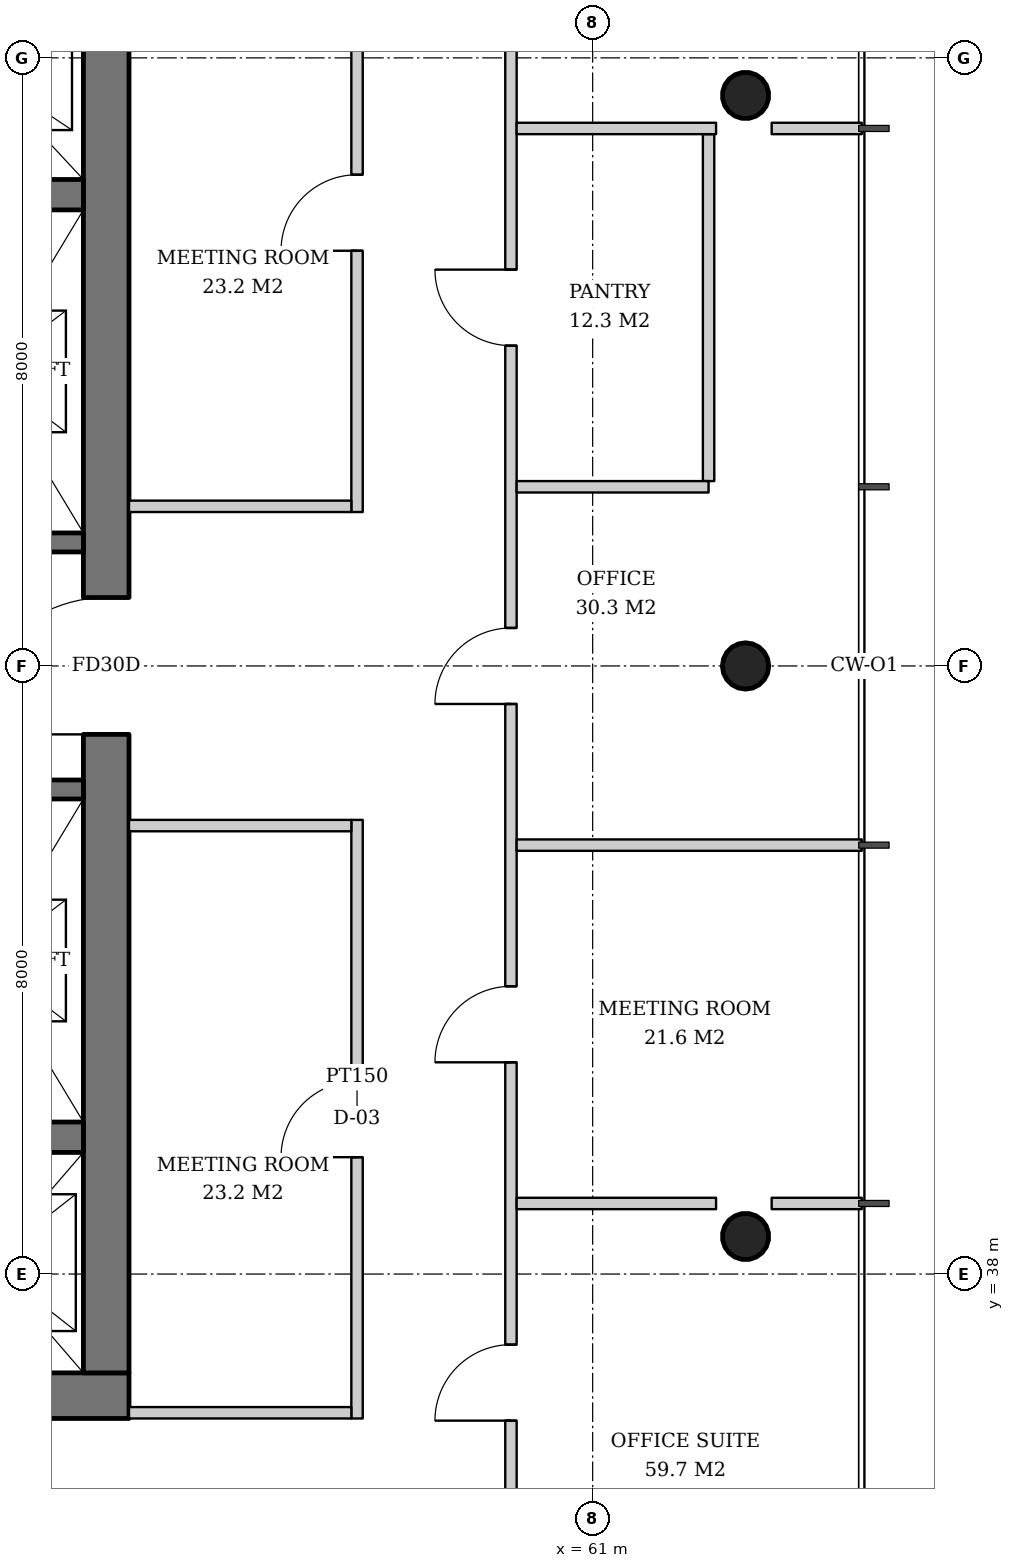
"""IFC4 building model, lengths in metres.
Left out: names, types, materials, properties, quantities, classifications, styles, units other than length and angle.
Written with IfcOpenShell. Run it as: python <this file> out.ifc"""

import sys

from ifc_helpers import new_model, si_unit, direction, frame, frame_2d, origin, origin_2d, place, context, subcontext, project, spatial, rectangle, hollow_circle, extrude, element, fill, save


model = new_model("IFC4")
c1 = context("Model", 3, precision=1e-05, world=origin(), true_north=direction((0.0, 1.0)))
c2 = subcontext(c1, "Body", "Model", "MODEL_VIEW")
j1 = project(units=[si_unit("LENGTHUNIT", "METRE"), si_unit("PLANEANGLEUNIT", "RADIAN")], contexts=[c1])
p1 = place(None, origin())
s1 = spatial("IfcSite", under=j1, at=p1, CompositionType="ELEMENT")
p2 = place(p1, origin())
s2 = spatial("IfcBuilding", under=s1, at=p2, CompositionType="ELEMENT")
p3 = place(p2, frame((0.0, 0.0, 207.2)))
s3 = spatial("IfcBuildingStorey", under=s2, at=p3, CompositionType="ELEMENT", Elevation=207.2)
p4 = place(p3, frame((63.05, 38.475, 0.0), z_axis=(-0.031974442509, 0.015923015547, 0.999361842679), x_axis=(-0.445775033553, -0.895145027055, 0.0)))
e1 = element("IfcColumn", 1, at=p4, inside=s3, PredefinedType="COLUMN", context=c2, shape_type="SweptSolid", body=[
    extrude(hollow_circle(Radius=0.305, WallThickness=0.025, at=origin_2d()), origin(), (0.0, 0.0, 1.0), 3.802),
])
p5 = place(p3, frame((63.05, 46.0, 0.0), z_axis=(-0.031978496719, 0.0, 0.999488557087), x_axis=(0.0, -1.0, 0.0)))
e2 = element("IfcColumn", 2, at=p5, inside=s3, PredefinedType="COLUMN", context=c2, shape_type="SweptSolid", body=[
    extrude(hollow_circle(Radius=0.305, WallThickness=0.025, at=origin_2d()), origin(), (0.0, 0.0, 1.0), 3.802),
])
p6 = place(p3, frame((63.05, 53.525, 0.0), z_axis=(-0.031974442509, -0.015923015547, 0.999361842679), x_axis=(0.445775033553, -0.895145027055, 0.0)))
e3 = element("IfcColumn", 3, at=p6, inside=s3, PredefinedType="COLUMN", context=c2, shape_type="SweptSolid", body=[
    extrude(hollow_circle(Radius=0.305, WallThickness=0.025, at=origin_2d()), origin(), (0.0, 0.0, 1.0), 3.802),
])
p7 = place(p3, frame((35.1, 36.4, 0.0), z_axis=(0.0, 0.0, 1.0), x_axis=(1.0, 0.0, 0.0)))
e4 = element("IfcWall", 4, at=p7, inside=s3, PredefinedType="SHEAR", context=c2, shape_type="SweptSolid", body=[
    extrude(rectangle(XDim=19.8, YDim=0.6, at=frame_2d((9.9, 0.0))), origin(), (0.0, 0.0, 1.0), 3.8),
])
p8 = place(p7, frame((3.9, 0.0, 0.0)))
e5 = element("IfcOpeningElement", 5, at=p8, cuts=e4, PredefinedType="OPENING", context=c2, shape_type="SweptSolid", body=[
    extrude(rectangle(XDim=1.0, YDim=2.1, at=frame_2d((0.5, 1.05))), frame((0.0, 0.31, 0.0), z_axis=(0.0, -1.0, 0.0), x_axis=(1.0, 0.0, 0.0)), (0.0, 0.0, 1.0), 0.62),
])
p9 = place(p7, frame((15.35, 0.0, 0.0)))
e6 = element("IfcOpeningElement", 6, at=p9, cuts=e4, PredefinedType="OPENING", context=c2, shape_type="SweptSolid", body=[
    extrude(rectangle(XDim=1.0, YDim=2.1, at=frame_2d((0.5, 1.05))), frame((0.0, 0.31, 0.0), z_axis=(0.0, -1.0, 0.0), x_axis=(1.0, 0.0, 0.0)), (0.0, 0.0, 1.0), 0.62),
])
p10 = place(p3, frame((54.6, 36.7, 0.0), z_axis=(0.0, 0.0, 1.0), x_axis=(0.0, 1.0, 0.0)))
e7 = element("IfcWall", 7, at=p10, inside=s3, PredefinedType="SHEAR", context=c2, shape_type="SweptSolid", body=[
    extrude(rectangle(XDim=18.6, YDim=0.6, at=frame_2d((9.3, 0.0))), origin(), (0.0, 0.0, 1.0), 3.8),
])
p11 = place(p10, frame((8.4, 0.0, 0.0)))
e8 = element("IfcOpeningElement", 8, at=p11, cuts=e7, PredefinedType="OPENING", context=c2, shape_type="SweptSolid", body=[
    extrude(rectangle(XDim=1.8, YDim=2.4, at=frame_2d((0.9, 1.2))), frame((0.0, 0.31, 0.0), z_axis=(0.0, -1.0, 0.0), x_axis=(1.0, 0.0, 0.0)), (0.0, 0.0, 1.0), 0.62),
])
for number, where, z_axis, x_axis in (
    (9, (35.7, 39.8, 0.0), (0.0, 0.0, 1.0), (1.0, 0.0, 0.0)),
    (10, (35.7, 52.2, 0.0), (0.0, 0.0, 1.0), (1.0, 0.0, 0.0)),
):
    element("IfcWall", number, at=place(p3, frame(where, z_axis=z_axis, x_axis=x_axis)), inside=s3, PredefinedType="SHEAR", context=c2, shape_type="SweptSolid", body=[
        extrude(rectangle(XDim=18.6, YDim=0.4, at=frame_2d((9.3, 0.0))), origin(), (0.0, 0.0, 1.0), 3.8),
    ])
for number, where, z_axis, x_axis in (
    (11, (48.93, 47.625, 0.0), (0.0, 0.0, 1.0), (1.0, 0.0, 0.0)),
    (12, (48.93, 44.375, 0.0), (0.0, 0.0, 1.0), (1.0, 0.0, 0.0)),
):
    element("IfcWall", number, at=place(p3, frame(where, z_axis=z_axis, x_axis=x_axis)), inside=s3, PredefinedType="SHEAR", context=c2, shape_type="SweptSolid", body=[
        extrude(rectangle(XDim=5.37, YDim=0.25, at=frame_2d((2.685, 0.0))), origin(), (0.0, 0.0, 1.0), 3.8),
    ])
p12 = place(p3, frame((57.9, 36.1, 0.0), z_axis=(0.0, 0.0, 1.0), x_axis=(0.0, 1.0, 0.0)))
e13 = element("IfcWall", 13, at=p12, inside=s3, PredefinedType="PARTITIONING", context=c2, shape_type="SweptSolid", body=[
    extrude(rectangle(XDim=7.875, YDim=0.15, at=frame_2d((3.938, 0.0))), origin(), (0.0, 0.0, 1.0), 2.867),
])
p13 = place(p12, frame((3.438, 0.0, 0.0)))
e14 = element("IfcOpeningElement", 14, at=p13, cuts=e13, PredefinedType="OPENING", context=c2, shape_type="SweptSolid", body=[
    extrude(rectangle(XDim=1.0, YDim=2.1, at=frame_2d((0.5, 1.05))), frame((0.0, 0.085, 0.0), z_axis=(0.0, -1.0, 0.0), x_axis=(1.0, 0.0, 0.0)), (0.0, 0.0, 1.0), 0.17),
])
p14 = place(p3, frame((54.9, 36.175, 0.0), z_axis=(0.0, 0.0, 1.0), x_axis=(1.0, 0.0, 0.0)))
e15 = element("IfcWall", 15, at=p14, inside=s3, PredefinedType="PARTITIONING", context=c2, shape_type="SweptSolid", body=[
    extrude(rectangle(XDim=2.925, YDim=0.15, at=frame_2d((1.462, 0.0))), origin(), (0.0, 0.0, 1.0), 2.867),
])
p15 = place(p3, frame((54.9, 43.9, 0.0), z_axis=(0.0, 0.0, 1.0), x_axis=(1.0, 0.0, 0.0)))
e16 = element("IfcWall", 16, at=p15, inside=s3, PredefinedType="PARTITIONING", context=c2, shape_type="SweptSolid", body=[
    extrude(rectangle(XDim=2.925, YDim=0.15, at=frame_2d((1.462, 0.0))), origin(), (0.0, 0.0, 1.0), 3.62),
])
p16 = place(p3, frame((57.9, 48.025, 0.0), z_axis=(0.0, 0.0, 1.0), x_axis=(0.0, 1.0, 0.0)))
e17 = element("IfcWall", 17, at=p16, inside=s3, PredefinedType="PARTITIONING", context=c2, shape_type="SweptSolid", body=[
    extrude(rectangle(XDim=7.875, YDim=0.15, at=frame_2d((3.938, 0.0))), origin(), (0.0, 0.0, 1.0), 2.867),
])
p17 = place(p16, frame((3.438, 0.0, 0.0)))
e18 = element("IfcOpeningElement", 18, at=p17, cuts=e17, PredefinedType="OPENING", context=c2, shape_type="SweptSolid", body=[
    extrude(rectangle(XDim=1.0, YDim=2.1, at=frame_2d((0.5, 1.05))), frame((0.0, 0.085, 0.0), z_axis=(0.0, -1.0, 0.0), x_axis=(1.0, 0.0, 0.0)), (0.0, 0.0, 1.0), 0.17),
])
p18 = place(p3, frame((54.9, 48.1, 0.0), z_axis=(0.0, 0.0, 1.0), x_axis=(1.0, 0.0, 0.0)))
e19 = element("IfcWall", 19, at=p18, inside=s3, PredefinedType="PARTITIONING", context=c2, shape_type="SweptSolid", body=[
    extrude(rectangle(XDim=2.925, YDim=0.15, at=frame_2d((1.462, 0.0))), origin(), (0.0, 0.0, 1.0), 2.867),
])
p19 = place(p3, frame((62.525, 48.432, 0.0), z_axis=(0.0, 0.0, 1.0), x_axis=(0.0, 1.0, 0.0)))
e20 = element("IfcWall", 20, at=p19, inside=s3, PredefinedType="PARTITIONING", context=c2, shape_type="SweptSolid", body=[
    extrude(rectangle(XDim=4.564, YDim=0.15, at=frame_2d((2.282, 0.0))), origin(), (0.0, 0.0, 1.0), 2.867),
])
p20 = place(p3, frame((59.925, 32.564, 0.0), z_axis=(0.0, 0.0, 1.0), x_axis=(0.0, 1.0, 0.0)))
e21 = element("IfcWall", 21, at=p20, inside=s3, PredefinedType="PARTITIONING", context=c2, shape_type="SweptSolid", body=[
    extrude(rectangle(XDim=26.872, YDim=0.15, at=frame_2d((13.436, 0.0))), origin(), (0.0, 0.0, 1.0), 2.867),
])
p21 = place(p20, frame((3.507, 0.0, 0.0)))
e22 = element("IfcOpeningElement", 22, at=p21, cuts=e21, PredefinedType="OPENING", context=c2, shape_type="SweptSolid", body=[
    extrude(rectangle(XDim=1.0, YDim=2.1, at=frame_2d((0.5, 1.05))), frame((0.0, 0.085, 0.0), z_axis=(0.0, -1.0, 0.0), x_axis=(1.0, 0.0, 0.0)), (0.0, 0.0, 1.0), 0.17),
])
p22 = place(p20, frame((8.221, 0.0, 0.0)))
e23 = element("IfcOpeningElement", 23, at=p22, cuts=e21, PredefinedType="OPENING", context=c2, shape_type="SweptSolid", body=[
    extrude(rectangle(XDim=1.0, YDim=2.1, at=frame_2d((0.5, 1.05))), frame((0.0, 0.085, 0.0), z_axis=(0.0, -1.0, 0.0), x_axis=(1.0, 0.0, 0.0)), (0.0, 0.0, 1.0), 0.17),
])
p23 = place(p20, frame((12.936, 0.0, 0.0)))
e24 = element("IfcOpeningElement", 24, at=p23, cuts=e21, PredefinedType="OPENING", context=c2, shape_type="SweptSolid", body=[
    extrude(rectangle(XDim=1.0, YDim=2.1, at=frame_2d((0.5, 1.05))), frame((0.0, 0.085, 0.0), z_axis=(0.0, -1.0, 0.0), x_axis=(1.0, 0.0, 0.0)), (0.0, 0.0, 1.0), 0.17),
])
p24 = place(p20, frame((17.65, 0.0, 0.0)))
e25 = element("IfcOpeningElement", 25, at=p24, cuts=e21, PredefinedType="OPENING", context=c2, shape_type="SweptSolid", body=[
    extrude(rectangle(XDim=1.0, YDim=2.1, at=frame_2d((0.5, 1.05))), frame((0.0, 0.085, 0.0), z_axis=(0.0, -1.0, 0.0), x_axis=(1.0, 0.0, 0.0)), (0.0, 0.0, 1.0), 0.17),
])
p25 = place(p20, frame((22.364, 0.0, 0.0)))
e26 = element("IfcOpeningElement", 26, at=p25, cuts=e21, PredefinedType="OPENING", context=c2, shape_type="SweptSolid", body=[
    extrude(rectangle(XDim=1.0, YDim=2.1, at=frame_2d((0.5, 1.05))), frame((0.0, 0.085, 0.0), z_axis=(0.0, -1.0, 0.0), x_axis=(1.0, 0.0, 0.0)), (0.0, 0.0, 1.0), 0.17),
])
p26 = place(p3, frame((60.0, 38.928, 0.0), z_axis=(0.0, 0.0, 1.0), x_axis=(1.0, 0.0, 0.0)))
e27 = element("IfcWall", 27, at=p26, inside=s3, PredefinedType="PARTITIONING", context=c2, shape_type="SweptSolid", body=[
    extrude(rectangle(XDim=2.624, YDim=0.15, at=frame_2d((1.312, 0.0))), origin(), (0.0, 0.0, 1.0), 3.62),
])
p27 = place(p3, frame((63.355, 38.928, 0.0), z_axis=(0.0, 0.0, 1.0), x_axis=(1.0, 0.0, 0.0)))
e28 = element("IfcWall", 28, at=p27, inside=s3, PredefinedType="PARTITIONING", context=c2, shape_type="SweptSolid", body=[
    extrude(rectangle(XDim=1.185, YDim=0.15, at=frame_2d((0.593, 0.0))), origin(), (0.0, 0.0, 1.0), 3.62),
])
p28 = place(p3, frame((60.0, 43.643, 0.0), z_axis=(0.0, 0.0, 1.0), x_axis=(1.0, 0.0, 0.0)))
e29 = element("IfcWall", 29, at=p28, inside=s3, PredefinedType="PARTITIONING", context=c2, shape_type="SweptSolid", body=[
    extrude(rectangle(XDim=4.54, YDim=0.15, at=frame_2d((2.27, 0.0))), origin(), (0.0, 0.0, 1.0), 3.12),
])
p29 = place(p3, frame((60.0, 48.357, 0.0), z_axis=(0.0, 0.0, 1.0), x_axis=(1.0, 0.0, 0.0)))
e30 = element("IfcWall", 30, at=p29, inside=s3, PredefinedType="PARTITIONING", context=c2, shape_type="SweptSolid", body=[
    extrude(rectangle(XDim=2.525, YDim=0.15, at=frame_2d((1.262, 0.0))), origin(), (0.0, 0.0, 1.0), 2.867),
])
p30 = place(p3, frame((60.0, 53.072, 0.0), z_axis=(0.0, 0.0, 1.0), x_axis=(1.0, 0.0, 0.0)))
e31 = element("IfcWall", 31, at=p30, inside=s3, PredefinedType="PARTITIONING", context=c2, shape_type="SweptSolid", body=[
    extrude(rectangle(XDim=2.624, YDim=0.15, at=frame_2d((1.312, 0.0))), origin(), (0.0, 0.0, 1.0), 3.62),
])
p31 = place(p3, frame((63.355, 53.072, 0.0), z_axis=(0.0, 0.0, 1.0), x_axis=(1.0, 0.0, 0.0)))
e32 = element("IfcWall", 32, at=p31, inside=s3, PredefinedType="PARTITIONING", context=c2, shape_type="SweptSolid", body=[
    extrude(rectangle(XDim=1.185, YDim=0.15, at=frame_2d((0.593, 0.0))), origin(), (0.0, 0.0, 1.0), 3.62),
])
p32 = place(p11, origin())
e33 = element("IfcDoor", 33, at=p32, inside=s3, OperationType="DOUBLE_DOOR_SINGLE_SWING", PredefinedType="DOOR", context=c2, shape_type="SweptSolid", body=[
    extrude(rectangle(XDim=1.8, YDim=2.4, at=frame_2d((0.9, 1.2))), frame((0.0, 0.025, 0.0), z_axis=(0.0, -1.0, 0.0), x_axis=(1.0, 0.0, 0.0)), (0.0, 0.0, 1.0), 0.05),
])
fill(e8, e33)
p33 = place(p13, origin())
e34 = element("IfcDoor", 34, at=p33, inside=s3, OperationType="SINGLE_SWING_LEFT", PredefinedType="DOOR", context=c2, shape_type="SweptSolid", body=[
    extrude(rectangle(XDim=1.0, YDim=2.1, at=frame_2d((0.5, 1.05))), frame((0.0, 0.025, 0.0), z_axis=(0.0, -1.0, 0.0), x_axis=(1.0, 0.0, 0.0)), (0.0, 0.0, 1.0), 0.05),
])
fill(e14, e34)
p34 = place(p17, origin())
e35 = element("IfcDoor", 35, at=p34, inside=s3, OperationType="SINGLE_SWING_LEFT", PredefinedType="DOOR", context=c2, shape_type="SweptSolid", body=[
    extrude(rectangle(XDim=1.0, YDim=2.1, at=frame_2d((0.5, 1.05))), frame((0.0, 0.025, 0.0), z_axis=(0.0, -1.0, 0.0), x_axis=(1.0, 0.0, 0.0)), (0.0, 0.0, 1.0), 0.05),
])
fill(e18, e35)
p35 = place(p21, origin())
e36 = element("IfcDoor", 36, at=p35, inside=s3, OperationType="SINGLE_SWING_LEFT", PredefinedType="DOOR", context=c2, shape_type="SweptSolid", body=[
    extrude(rectangle(XDim=1.0, YDim=2.1, at=frame_2d((0.5, 1.05))), frame((0.0, 0.025, 0.0), z_axis=(0.0, -1.0, 0.0), x_axis=(1.0, 0.0, 0.0)), (0.0, 0.0, 1.0), 0.05),
])
fill(e22, e36)
p36 = place(p22, origin())
e37 = element("IfcDoor", 37, at=p36, inside=s3, OperationType="SINGLE_SWING_LEFT", PredefinedType="DOOR", context=c2, shape_type="SweptSolid", body=[
    extrude(rectangle(XDim=1.0, YDim=2.1, at=frame_2d((0.5, 1.05))), frame((0.0, 0.025, 0.0), z_axis=(0.0, -1.0, 0.0), x_axis=(1.0, 0.0, 0.0)), (0.0, 0.0, 1.0), 0.05),
])
fill(e23, e37)
p37 = place(p23, origin())
e38 = element("IfcDoor", 38, at=p37, inside=s3, OperationType="SINGLE_SWING_LEFT", PredefinedType="DOOR", context=c2, shape_type="SweptSolid", body=[
    extrude(rectangle(XDim=1.0, YDim=2.1, at=frame_2d((0.5, 1.05))), frame((0.0, 0.025, 0.0), z_axis=(0.0, -1.0, 0.0), x_axis=(1.0, 0.0, 0.0)), (0.0, 0.0, 1.0), 0.05),
])
fill(e24, e38)
p38 = place(p24, origin())
e39 = element("IfcDoor", 39, at=p38, inside=s3, OperationType="SINGLE_SWING_RIGHT", PredefinedType="DOOR", context=c2, shape_type="SweptSolid", body=[
    extrude(rectangle(XDim=1.0, YDim=2.1, at=frame_2d((0.5, 1.05))), frame((0.0, 0.025, 0.0), z_axis=(0.0, -1.0, 0.0), x_axis=(1.0, 0.0, 0.0)), (0.0, 0.0, 1.0), 0.05),
])
fill(e25, e39)
save(model, sys.argv[1])
